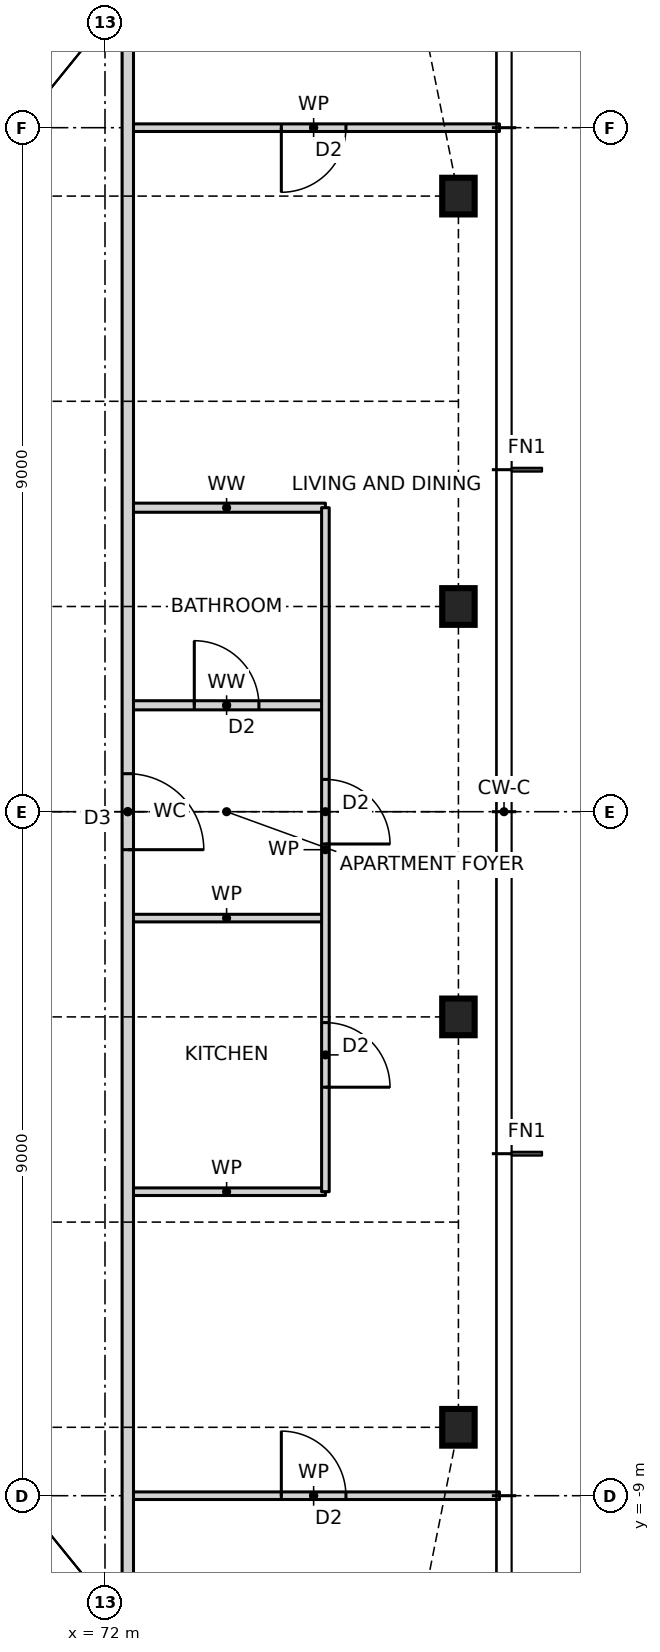
"""IFC4 building model, lengths in metres.
Left out: names, types, materials, properties, quantities, classifications, styles, units other than length and angle.
Written with IfcOpenShell. Run it as: python <this file> out.ifc"""

import sys

from ifc_helpers import new_model, si_unit, direction, frame, frame_2d, origin, origin_2d, place, context, subcontext, project, spatial, rectangle, i_section, extrude, element, fill, save


model = new_model("IFC4")
c1 = context("Model", 3, precision=1e-05, world=origin(), true_north=direction((0.0, 1.0)))
c2 = subcontext(c1, "Body", "Model", "MODEL_VIEW")
j1 = project(units=[si_unit("LENGTHUNIT", "METRE"), si_unit("PLANEANGLEUNIT", "RADIAN")], contexts=[c1])
p1 = place(None, origin())
s1 = spatial("IfcSite", under=j1, at=p1, CompositionType="ELEMENT")
p2 = place(p1, origin())
s2 = spatial("IfcBuilding", under=s1, at=p2, CompositionType="ELEMENT")
p3 = place(p2, frame((0.0, 0.0, 112.0)))
s3 = spatial("IfcBuildingStorey", under=s2, at=p3, CompositionType="ELEMENT", Elevation=112.0)
for number, where, z_axis, x_axis in (
    (1, (76.65, -8.1, 0.0), (0.0, 0.0, 1.0), (1.0, 0.0, 0.0)),
    (2, (76.65, -2.7, 0.0), (0.0, 0.0, 1.0), (1.0, 0.0, 0.0)),
    (3, (76.65, 2.7, 0.0), (0.0, 0.0, 1.0), (1.0, 0.0, 0.0)),
    (4, (76.65, 8.1, 0.0), (0.0, 0.0, 1.0), (1.0, 0.0, 0.0)),
):
    element("IfcColumn", number, at=place(p3, frame(where, z_axis=z_axis, x_axis=x_axis)), inside=s3, PredefinedType="COLUMN", context=c2, shape_type="SweptSolid", body=[
        extrude(i_section(OverallWidth=0.427, OverallDepth=0.483, WebThickness=0.051, FlangeThickness=0.082, at=origin_2d()), origin(), (0.0, 0.0, 1.0), 3.5),
    ])
p4 = place(p3, frame((72.3, -9.0, 0.0), z_axis=(0.0, 0.0, 1.0), x_axis=(1.0, 0.0, 0.0)))
e5 = element("IfcWall", 5, at=p4, inside=s3, PredefinedType="PARTITIONING", context=c2, shape_type="SweptSolid", body=[
    extrude(rectangle(XDim=4.89, YDim=0.1, at=frame_2d((2.445, 0.0))), origin(), (0.0, 0.0, 1.0), 3.27),
])
p5 = place(p4, frame((2.02, 0.0, 0.0)))
e6 = element("IfcOpeningElement", 6, at=p5, cuts=e5, PredefinedType="OPENING", context=c2, shape_type="SweptSolid", body=[
    extrude(rectangle(XDim=0.85, YDim=2.1, at=frame_2d((0.425, 1.05))), frame((0.0, 0.06, 0.0), z_axis=(0.0, -1.0, 0.0), x_axis=(1.0, 0.0, 0.0)), (0.0, 0.0, 1.0), 0.12),
])
for number, where, z_axis, x_axis in (
    (7, (72.3, -5.0, 0.0), (0.0, 0.0, 1.0), (1.0, 0.0, 0.0)),
    (8, (72.3, -1.4, 0.0), (0.0, 0.0, 1.0), (1.0, 0.0, 0.0)),
):
    element("IfcWall", number, at=place(p3, frame(where, z_axis=z_axis, x_axis=x_axis)), inside=s3, PredefinedType="PARTITIONING", context=c2, shape_type="SweptSolid", body=[
        extrude(rectangle(XDim=2.6, YDim=0.1, at=frame_2d((1.3, 0.0))), origin(), (0.0, 0.0, 1.0), 3.27),
    ])
p6 = place(p3, frame((72.3, 1.4, 0.0), z_axis=(0.0, 0.0, 1.0), x_axis=(1.0, 0.0, 0.0)))
e9 = element("IfcWall", 9, at=p6, inside=s3, PredefinedType="PARTITIONING", context=c2, shape_type="SweptSolid", body=[
    extrude(rectangle(XDim=2.6, YDim=0.12, at=frame_2d((1.3, 0.0))), origin(), (0.0, 0.0, 1.0), 3.27),
])
p7 = place(p6, frame((0.875, 0.0, 0.0)))
e10 = element("IfcOpeningElement", 10, at=p7, cuts=e9, PredefinedType="OPENING", context=c2, shape_type="SweptSolid", body=[
    extrude(rectangle(XDim=0.85, YDim=2.1, at=frame_2d((0.425, 1.05))), frame((0.0, 0.07, 0.0), z_axis=(0.0, -1.0, 0.0), x_axis=(1.0, 0.0, 0.0)), (0.0, 0.0, 1.0), 0.14),
])
p8 = place(p3, frame((72.3, 4.0, 0.0), z_axis=(0.0, 0.0, 1.0), x_axis=(1.0, 0.0, 0.0)))
e11 = element("IfcWall", 11, at=p8, inside=s3, PredefinedType="PARTITIONING", context=c2, shape_type="SweptSolid", body=[
    extrude(rectangle(XDim=2.6, YDim=0.12, at=frame_2d((1.3, 0.0))), origin(), (0.0, 0.0, 1.0), 3.27),
])
p9 = place(p3, frame((72.3, 9.0, 0.0), z_axis=(0.0, 0.0, 1.0), x_axis=(1.0, 0.0, 0.0)))
e12 = element("IfcWall", 12, at=p9, inside=s3, PredefinedType="PARTITIONING", context=c2, shape_type="SweptSolid", body=[
    extrude(rectangle(XDim=4.89, YDim=0.1, at=frame_2d((2.445, 0.0))), origin(), (0.0, 0.0, 1.0), 3.27),
])
p10 = place(p9, frame((2.02, 0.0, 0.0)))
e13 = element("IfcOpeningElement", 13, at=p10, cuts=e12, PredefinedType="OPENING", context=c2, shape_type="SweptSolid", body=[
    extrude(rectangle(XDim=0.85, YDim=2.1, at=frame_2d((0.425, 1.05))), frame((0.0, 0.06, 0.0), z_axis=(0.0, -1.0, 0.0), x_axis=(1.0, 0.0, 0.0)), (0.0, 0.0, 1.0), 0.12),
])
p11 = place(p3, frame((74.9, -5.0, 0.0), z_axis=(0.0, 0.0, 1.0), x_axis=(0.0, 1.0, 0.0)))
e14 = element("IfcWall", 14, at=p11, inside=s3, PredefinedType="PARTITIONING", context=c2, shape_type="SweptSolid", body=[
    extrude(rectangle(XDim=9.0, YDim=0.1, at=frame_2d((4.5, 0.0))), origin(), (0.0, 0.0, 1.0), 3.27),
])
p12 = place(p11, frame((1.375, 0.0, 0.0)))
e15 = element("IfcOpeningElement", 15, at=p12, cuts=e14, PredefinedType="OPENING", context=c2, shape_type="SweptSolid", body=[
    extrude(rectangle(XDim=0.85, YDim=2.1, at=frame_2d((0.425, 1.05))), frame((0.0, 0.06, 0.0), z_axis=(0.0, -1.0, 0.0), x_axis=(1.0, 0.0, 0.0)), (0.0, 0.0, 1.0), 0.12),
])
p13 = place(p11, frame((4.575, 0.0, 0.0)))
e16 = element("IfcOpeningElement", 16, at=p13, cuts=e14, PredefinedType="OPENING", context=c2, shape_type="SweptSolid", body=[
    extrude(rectangle(XDim=0.85, YDim=2.1, at=frame_2d((0.425, 1.05))), frame((0.0, 0.06, 0.0), z_axis=(0.0, -1.0, 0.0), x_axis=(1.0, 0.0, 0.0)), (0.0, 0.0, 1.0), 0.12),
])
p14 = place(p3, frame((72.3, -10.768, 0.0), z_axis=(0.0, 0.0, 1.0), x_axis=(0.0, 1.0, 0.0)))
e17 = element("IfcWall", 17, at=p14, inside=s3, PredefinedType="PARTITIONING", context=c2, shape_type="SweptSolid", body=[
    extrude(rectangle(XDim=21.536, YDim=0.15, at=frame_2d((10.768, 0.0))), origin(), (0.0, 0.0, 1.0), 3.27),
])
p15 = place(p14, frame((10.268, 0.0, 0.0)))
e18 = element("IfcOpeningElement", 18, at=p15, cuts=e17, PredefinedType="OPENING", context=c2, shape_type="SweptSolid", body=[
    extrude(rectangle(XDim=1.0, YDim=2.1, at=frame_2d((0.5, 1.05))), frame((0.0, 0.085, 0.0), z_axis=(0.0, -1.0, 0.0), x_axis=(1.0, 0.0, 0.0)), (0.0, 0.0, 1.0), 0.17),
])
p16 = place(p12, frame((0.85, 0.0, 0.0), z_axis=(0.0, 0.0, 1.0), x_axis=(-1.0, 0.0, 0.0)))
e19 = element("IfcDoor", 19, at=p16, inside=s3, OperationType="SINGLE_SWING_RIGHT", PredefinedType="DOOR", context=c2, shape_type="SweptSolid", body=[
    extrude(rectangle(XDim=0.85, YDim=2.1, at=frame_2d((0.425, 1.05))), frame((0.0, 0.025, 0.0), z_axis=(0.0, -1.0, 0.0), x_axis=(1.0, 0.0, 0.0)), (0.0, 0.0, 1.0), 0.05),
])
fill(e15, e19)
p17 = place(p15, frame((1.0, 0.0, 0.0), z_axis=(0.0, 0.0, 1.0), x_axis=(-1.0, 0.0, 0.0)))
e20 = element("IfcDoor", 20, at=p17, inside=s3, OperationType="SINGLE_SWING_RIGHT", PredefinedType="DOOR", context=c2, shape_type="SweptSolid", body=[
    extrude(rectangle(XDim=1.0, YDim=2.1, at=frame_2d((0.5, 1.05))), frame((0.0, 0.025, 0.0), z_axis=(0.0, -1.0, 0.0), x_axis=(1.0, 0.0, 0.0)), (0.0, 0.0, 1.0), 0.05),
])
fill(e18, e20)
p18 = place(p13, frame((0.85, 0.0, 0.0), z_axis=(0.0, 0.0, 1.0), x_axis=(-1.0, 0.0, 0.0)))
e21 = element("IfcDoor", 21, at=p18, inside=s3, OperationType="SINGLE_SWING_RIGHT", PredefinedType="DOOR", context=c2, shape_type="SweptSolid", body=[
    extrude(rectangle(XDim=0.85, YDim=2.1, at=frame_2d((0.425, 1.05))), frame((0.0, 0.025, 0.0), z_axis=(0.0, -1.0, 0.0), x_axis=(1.0, 0.0, 0.0)), (0.0, 0.0, 1.0), 0.05),
])
fill(e16, e21)
p19 = place(p7, origin())
e22 = element("IfcDoor", 22, at=p19, inside=s3, OperationType="SINGLE_SWING_LEFT", PredefinedType="DOOR", context=c2, shape_type="SweptSolid", body=[
    extrude(rectangle(XDim=0.85, YDim=2.1, at=frame_2d((0.425, 1.05))), frame((0.0, 0.025, 0.0), z_axis=(0.0, -1.0, 0.0), x_axis=(1.0, 0.0, 0.0)), (0.0, 0.0, 1.0), 0.05),
])
fill(e10, e22)
p20 = place(p5, origin())
e23 = element("IfcDoor", 23, at=p20, inside=s3, OperationType="SINGLE_SWING_LEFT", PredefinedType="DOOR", context=c2, shape_type="SweptSolid", body=[
    extrude(rectangle(XDim=0.85, YDim=2.1, at=frame_2d((0.425, 1.05))), frame((0.0, 0.025, 0.0), z_axis=(0.0, -1.0, 0.0), x_axis=(1.0, 0.0, 0.0)), (0.0, 0.0, 1.0), 0.05),
])
fill(e6, e23)
p21 = place(p10, frame((0.85, 0.0, 0.0), z_axis=(0.0, 0.0, 1.0), x_axis=(-1.0, 0.0, 0.0)))
e24 = element("IfcDoor", 24, at=p21, inside=s3, OperationType="SINGLE_SWING_RIGHT", PredefinedType="DOOR", context=c2, shape_type="SweptSolid", body=[
    extrude(rectangle(XDim=0.85, YDim=2.1, at=frame_2d((0.425, 1.05))), frame((0.0, 0.025, 0.0), z_axis=(0.0, -1.0, 0.0), x_axis=(1.0, 0.0, 0.0)), (0.0, 0.0, 1.0), 0.05),
])
fill(e13, e24)
save(model, sys.argv[1])
